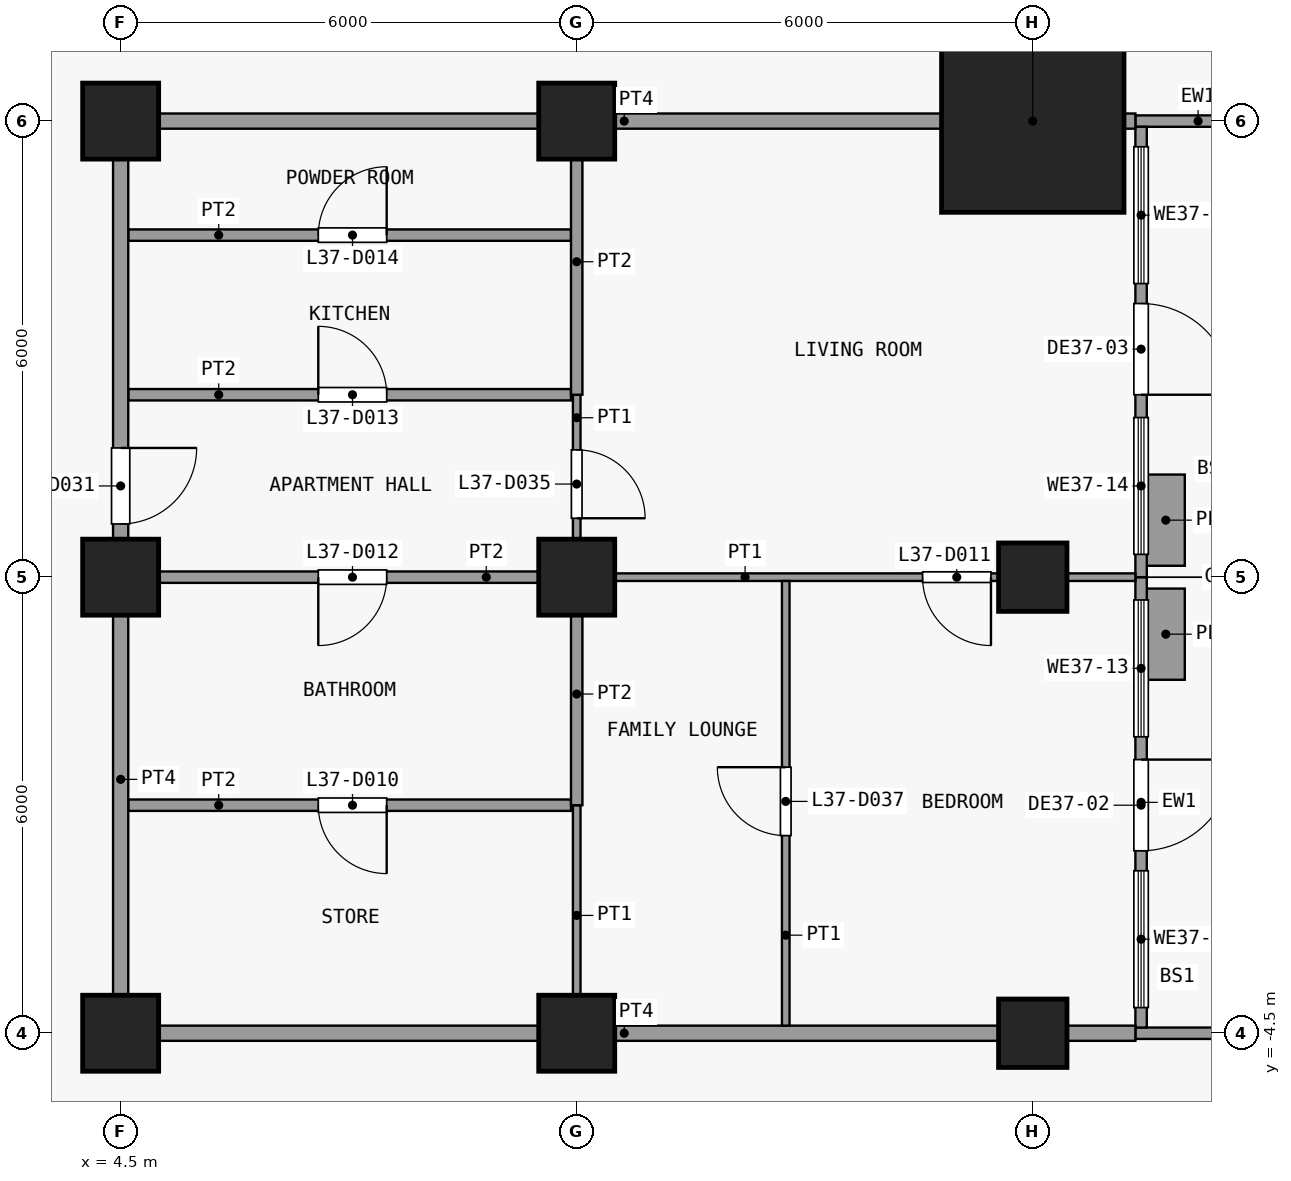
"""IFC4 building model, lengths in metres.
Left out: names, types, materials, properties, quantities, classifications, styles, units other than length and angle.
Written with IfcOpenShell. Run it as: python <this file> out.ifc"""

import sys

from ifc_helpers import new_model, si_unit, direction, frame, frame_2d, origin, origin_2d, place, context, subcontext, project, spatial, rectangle, extrude, element, fill, save


model = new_model("IFC4")
c1 = context("Model", 3, precision=1e-05, world=origin(), true_north=direction((0.0, 1.0)))
c2 = subcontext(c1, "Body", "Model", "MODEL_VIEW")
j1 = project(units=[si_unit("LENGTHUNIT", "METRE"), si_unit("PLANEANGLEUNIT", "RADIAN")], contexts=[c1])
p1 = place(None, origin())
s1 = spatial("IfcSite", under=j1, at=p1, CompositionType="ELEMENT")
p2 = place(p1, origin())
s2 = spatial("IfcBuilding", under=s1, at=p2, CompositionType="ELEMENT")
p3 = place(p2, frame((0.0, 0.0, 152.9)))
s3 = spatial("IfcBuildingStorey", under=s2, at=p3, CompositionType="ELEMENT", Elevation=152.9)
for number, where, z_axis, x_axis in (
    (1, (4.5, -4.5, 0.0), (0.0, 0.0, 1.0), (1.0, 0.0, 0.0)),
    (2, (4.5, 1.5, 0.0), (0.0, 0.0, 1.0), (1.0, 0.0, 0.0)),
    (3, (4.5, 7.5, 0.0), (0.0, 0.0, 1.0), (1.0, 0.0, 0.0)),
    (4, (10.5, -4.5, 0.0), (0.0, 0.0, 1.0), (1.0, 0.0, 0.0)),
    (5, (10.5, 1.5, 0.0), (0.0, 0.0, 1.0), (1.0, 0.0, 0.0)),
    (6, (10.5, 7.5, 0.0), (0.0, 0.0, 1.0), (1.0, 0.0, 0.0)),
):
    element("IfcColumn", number, at=place(p3, frame(where, z_axis=z_axis, x_axis=x_axis)), inside=s3, PredefinedType="COLUMN", context=c2, shape_type="SweptSolid", body=[
        extrude(rectangle(XDim=1.0, YDim=1.0, at=origin_2d()), origin(), (0.0, 0.0, 1.0), 3.6),
    ])
for number, where, z_axis, x_axis in (
    (7, (16.5, -4.5, 0.0), (0.0, 0.0, 1.0), (1.0, 0.0, 0.0)),
    (8, (16.5, 1.5, 0.0), (0.0, 0.0, 1.0), (1.0, 0.0, 0.0)),
):
    element("IfcColumn", number, at=place(p3, frame(where, z_axis=z_axis, x_axis=x_axis)), inside=s3, PredefinedType="COLUMN", context=c2, shape_type="SweptSolid", body=[
        extrude(rectangle(XDim=0.9, YDim=0.9, at=origin_2d()), origin(), (0.0, 0.0, 1.0), 3.6),
    ])
p4 = place(p3, frame((16.5, 7.5, 0.0), z_axis=(0.0, 0.0, 1.0), x_axis=(1.0, 0.0, 0.0)))
e9 = element("IfcColumn", 9, at=p4, inside=s3, PredefinedType="COLUMN", context=c2, shape_type="SweptSolid", body=[
    extrude(rectangle(XDim=2.4, YDim=2.4, at=origin_2d()), origin(), (0.0, 0.0, 1.0), 3.6),
])
p5 = place(p3, frame((17.85, -4.5, 0.0), z_axis=(0.0, 0.0, 1.0), x_axis=(1.0, 0.0, 0.0)))
e10 = element("IfcWall", 10, at=p5, inside=s3, PredefinedType="SOLIDWALL", context=c2, shape_type="SweptSolid", body=[
    extrude(rectangle(XDim=2.55, YDim=0.15, at=frame_2d((1.275, 0.0))), origin(), (0.0, 0.0, 1.0), 3.3),
])
p6 = place(p3, frame((17.925, 1.5, 0.0), z_axis=(0.0, 0.0, 1.0), x_axis=(0.0, -1.0, 0.0)))
e11 = element("IfcWall", 11, at=p6, inside=s3, PredefinedType="SOLIDWALL", context=c2, shape_type="SweptSolid", body=[
    extrude(rectangle(XDim=5.925, YDim=0.15, at=frame_2d((2.962, 0.0))), origin(), (0.0, 0.0, 1.0), 3.3),
])
p7 = place(p6, frame((2.4, 0.0, 0.0)))
e12 = element("IfcOpeningElement", 12, at=p7, cuts=e11, PredefinedType="OPENING", context=c2, shape_type="SweptSolid", body=[
    extrude(rectangle(XDim=1.2, YDim=2.4, at=frame_2d((0.6, 1.2))), frame((0.0, 0.085, 0.0), z_axis=(0.0, -1.0, 0.0), x_axis=(1.0, 0.0, 0.0)), (0.0, 0.0, 1.0), 0.17),
])
p8 = place(p6, frame((3.863, 0.0, 0.9)))
e13 = element("IfcOpeningElement", 13, at=p8, cuts=e11, PredefinedType="OPENING", context=c2, shape_type="SweptSolid", body=[
    extrude(rectangle(XDim=1.8, YDim=2.1, at=frame_2d((0.9, 1.05))), frame((0.0, 0.085, 0.0), z_axis=(0.0, -1.0, 0.0), x_axis=(1.0, 0.0, 0.0)), (0.0, 0.0, 1.0), 0.17),
])
p9 = place(p6, frame((0.3, 0.0, 0.9)))
e14 = element("IfcOpeningElement", 14, at=p9, cuts=e11, PredefinedType="OPENING", context=c2, shape_type="SweptSolid", body=[
    extrude(rectangle(XDim=1.8, YDim=2.1, at=frame_2d((0.9, 1.05))), frame((0.0, 0.085, 0.0), z_axis=(0.0, -1.0, 0.0), x_axis=(1.0, 0.0, 0.0)), (0.0, 0.0, 1.0), 0.17),
])
p10 = place(p3, frame((18.25, 0.15, 0.0), z_axis=(0.0, 0.0, 1.0), x_axis=(0.0, 1.0, 0.0)))
e15 = element("IfcWall", 15, at=p10, inside=s3, PredefinedType="USERDEFINED", context=c2, shape_type="SweptSolid", body=[
    extrude(rectangle(XDim=1.2, YDim=0.5, at=frame_2d((0.6, 0.0))), origin(), (0.0, 0.0, 1.0), 0.9),
])
p11 = place(p3, frame((17.85, 7.5, 0.0), z_axis=(0.0, 0.0, 1.0), x_axis=(1.0, 0.0, 0.0)))
e16 = element("IfcWall", 16, at=p11, inside=s3, PredefinedType="SOLIDWALL", context=c2, shape_type="SweptSolid", body=[
    extrude(rectangle(XDim=1.65, YDim=0.15, at=frame_2d((0.825, 0.0))), origin(), (0.0, 0.0, 1.0), 3.3),
])
p12 = place(p3, frame((17.925, 7.425, 0.0), z_axis=(0.0, 0.0, 1.0), x_axis=(0.0, -1.0, 0.0)))
e17 = element("IfcWall", 17, at=p12, inside=s3, PredefinedType="SOLIDWALL", context=c2, shape_type="SweptSolid", body=[
    extrude(rectangle(XDim=5.925, YDim=0.15, at=frame_2d((2.962, 0.0))), origin(), (0.0, 0.0, 1.0), 3.3),
])
p13 = place(p12, frame((2.325, 0.0, 0.0)))
e18 = element("IfcOpeningElement", 18, at=p13, cuts=e17, PredefinedType="OPENING", context=c2, shape_type="SweptSolid", body=[
    extrude(rectangle(XDim=1.2, YDim=2.4, at=frame_2d((0.6, 1.2))), frame((0.0, 0.085, 0.0), z_axis=(0.0, -1.0, 0.0), x_axis=(1.0, 0.0, 0.0)), (0.0, 0.0, 1.0), 0.17),
])
p14 = place(p12, frame((3.825, 0.0, 0.9)))
e19 = element("IfcOpeningElement", 19, at=p14, cuts=e17, PredefinedType="OPENING", context=c2, shape_type="SweptSolid", body=[
    extrude(rectangle(XDim=1.8, YDim=2.1, at=frame_2d((0.9, 1.05))), frame((0.0, 0.085, 0.0), z_axis=(0.0, -1.0, 0.0), x_axis=(1.0, 0.0, 0.0)), (0.0, 0.0, 1.0), 0.17),
])
p15 = place(p12, frame((0.262, 0.0, 0.9)))
e20 = element("IfcOpeningElement", 20, at=p15, cuts=e17, PredefinedType="OPENING", context=c2, shape_type="SweptSolid", body=[
    extrude(rectangle(XDim=1.8, YDim=2.1, at=frame_2d((0.9, 1.05))), frame((0.0, 0.085, 0.0), z_axis=(0.0, -1.0, 0.0), x_axis=(1.0, 0.0, 0.0)), (0.0, 0.0, 1.0), 0.17),
])
p16 = place(p3, frame((18.25, 1.65, 0.0), z_axis=(0.0, 0.0, 1.0), x_axis=(0.0, 1.0, 0.0)))
e21 = element("IfcWall", 21, at=p16, inside=s3, PredefinedType="USERDEFINED", context=c2, shape_type="SweptSolid", body=[
    extrude(rectangle(XDim=1.2, YDim=0.5, at=frame_2d((0.6, 0.0))), origin(), (0.0, 0.0, 1.0), 0.9),
])
p17 = place(p3, frame((4.4, -4.5, 0.0), z_axis=(0.0, 0.0, 1.0), x_axis=(1.0, 0.0, 0.0)))
e22 = element("IfcWall", 22, at=p17, inside=s3, PredefinedType="PARTITIONING", context=c2, shape_type="SweptSolid", body=[
    extrude(rectangle(XDim=13.45, YDim=0.2, at=frame_2d((6.725, 0.0))), origin(), (0.0, 0.0, 1.0), 3.3),
])
p18 = place(p3, frame((4.6, -1.5, 0.0), z_axis=(0.0, 0.0, 1.0), x_axis=(1.0, 0.0, 0.0)))
e23 = element("IfcWall", 23, at=p18, inside=s3, PredefinedType="PARTITIONING", context=c2, shape_type="SweptSolid", body=[
    extrude(rectangle(XDim=5.825, YDim=0.15, at=frame_2d((2.913, 0.0))), origin(), (0.0, 0.0, 1.0), 3.3),
])
p19 = place(p18, frame((2.5, 0.0, 0.0)))
e24 = element("IfcOpeningElement", 24, at=p19, cuts=e23, PredefinedType="OPENING", context=c2, shape_type="SweptSolid", body=[
    extrude(rectangle(XDim=0.9, YDim=2.1, at=frame_2d((0.45, 1.05))), frame((0.0, 0.085, 0.0), z_axis=(0.0, -1.0, 0.0), x_axis=(1.0, 0.0, 0.0)), (0.0, 0.0, 1.0), 0.17),
])
p20 = place(p3, frame((10.5, 1.5, 0.0), z_axis=(0.0, 0.0, 1.0), x_axis=(1.0, 0.0, 0.0)))
e25 = element("IfcWall", 25, at=p20, inside=s3, PredefinedType="PARTITIONING", context=c2, shape_type="SweptSolid", body=[
    extrude(rectangle(XDim=7.35, YDim=0.1, at=frame_2d((3.675, 0.0))), origin(), (0.0, 0.0, 1.0), 3.3),
])
p21 = place(p20, frame((4.55, 0.0, 0.0)))
e26 = element("IfcOpeningElement", 26, at=p21, cuts=e25, PredefinedType="OPENING", context=c2, shape_type="SweptSolid", body=[
    extrude(rectangle(XDim=0.9, YDim=2.1, at=frame_2d((0.45, 1.05))), frame((0.0, 0.06, 0.0), z_axis=(0.0, -1.0, 0.0), x_axis=(1.0, 0.0, 0.0)), (0.0, 0.0, 1.0), 0.12),
])
p22 = place(p3, frame((4.6, 1.5, 0.0), z_axis=(0.0, 0.0, 1.0), x_axis=(1.0, 0.0, 0.0)))
e27 = element("IfcWall", 27, at=p22, inside=s3, PredefinedType="PARTITIONING", context=c2, shape_type="SweptSolid", body=[
    extrude(rectangle(XDim=5.9, YDim=0.15, at=frame_2d((2.95, 0.0))), origin(), (0.0, 0.0, 1.0), 3.3),
])
p23 = place(p22, frame((2.5, 0.0, 0.0)))
e28 = element("IfcOpeningElement", 28, at=p23, cuts=e27, PredefinedType="OPENING", context=c2, shape_type="SweptSolid", body=[
    extrude(rectangle(XDim=0.9, YDim=2.1, at=frame_2d((0.45, 1.05))), frame((0.0, 0.085, 0.0), z_axis=(0.0, -1.0, 0.0), x_axis=(1.0, 0.0, 0.0)), (0.0, 0.0, 1.0), 0.17),
])
p24 = place(p3, frame((4.6, 3.9, 0.0), z_axis=(0.0, 0.0, 1.0), x_axis=(1.0, 0.0, 0.0)))
e29 = element("IfcWall", 29, at=p24, inside=s3, PredefinedType="PARTITIONING", context=c2, shape_type="SweptSolid", body=[
    extrude(rectangle(XDim=5.825, YDim=0.15, at=frame_2d((2.913, 0.0))), origin(), (0.0, 0.0, 1.0), 3.3),
])
p25 = place(p24, frame((2.5, 0.0, 0.0)))
e30 = element("IfcOpeningElement", 30, at=p25, cuts=e29, PredefinedType="OPENING", context=c2, shape_type="SweptSolid", body=[
    extrude(rectangle(XDim=0.9, YDim=2.1, at=frame_2d((0.45, 1.05))), frame((0.0, 0.085, 0.0), z_axis=(0.0, -1.0, 0.0), x_axis=(1.0, 0.0, 0.0)), (0.0, 0.0, 1.0), 0.17),
])
p26 = place(p3, frame((4.6, 6.0, 0.0), z_axis=(0.0, 0.0, 1.0), x_axis=(1.0, 0.0, 0.0)))
e31 = element("IfcWall", 31, at=p26, inside=s3, PredefinedType="PARTITIONING", context=c2, shape_type="SweptSolid", body=[
    extrude(rectangle(XDim=5.825, YDim=0.15, at=frame_2d((2.913, 0.0))), origin(), (0.0, 0.0, 1.0), 3.3),
])
p27 = place(p26, frame((2.5, 0.0, 0.0)))
e32 = element("IfcOpeningElement", 32, at=p27, cuts=e31, PredefinedType="OPENING", context=c2, shape_type="SweptSolid", body=[
    extrude(rectangle(XDim=0.9, YDim=2.1, at=frame_2d((0.45, 1.05))), frame((0.0, 0.085, 0.0), z_axis=(0.0, -1.0, 0.0), x_axis=(1.0, 0.0, 0.0)), (0.0, 0.0, 1.0), 0.17),
])
p28 = place(p3, frame((4.4, 7.5, 0.0), z_axis=(0.0, 0.0, 1.0), x_axis=(1.0, 0.0, 0.0)))
e33 = element("IfcWall", 33, at=p28, inside=s3, PredefinedType="PARTITIONING", context=c2, shape_type="SweptSolid", body=[
    extrude(rectangle(XDim=13.45, YDim=0.2, at=frame_2d((6.725, 0.0))), origin(), (0.0, 0.0, 1.0), 3.3),
])
p29 = place(p3, frame((4.5, -4.4, 0.0), z_axis=(0.0, 0.0, 1.0), x_axis=(0.0, 1.0, 0.0)))
e34 = element("IfcWall", 34, at=p29, inside=s3, PredefinedType="PARTITIONING", context=c2, shape_type="SweptSolid", body=[
    extrude(rectangle(XDim=11.8, YDim=0.2, at=frame_2d((5.9, 0.0))), origin(), (0.0, 0.0, 1.0), 3.3),
])
p30 = place(p29, frame((6.6, 0.0, 0.0)))
e35 = element("IfcOpeningElement", 35, at=p30, cuts=e34, PredefinedType="OPENING", context=c2, shape_type="SweptSolid", body=[
    extrude(rectangle(XDim=1.0, YDim=2.1, at=frame_2d((0.5, 1.05))), frame((0.0, 0.11, 0.0), z_axis=(0.0, -1.0, 0.0), x_axis=(1.0, 0.0, 0.0)), (0.0, 0.0, 1.0), 0.22),
])
p31 = place(p3, frame((10.5, -4.4, 0.0), z_axis=(0.0, 0.0, 1.0), x_axis=(0.0, 1.0, 0.0)))
e36 = element("IfcWall", 36, at=p31, inside=s3, PredefinedType="PARTITIONING", context=c2, shape_type="SweptSolid", body=[
    extrude(rectangle(XDim=2.9, YDim=0.1, at=frame_2d((1.45, 0.0))), origin(), (0.0, 0.0, 1.0), 3.3),
])
p32 = place(p3, frame((10.5, 1.575, 0.0), z_axis=(0.0, 0.0, 1.0), x_axis=(0.0, 1.0, 0.0)))
e37 = element("IfcWall", 37, at=p32, inside=s3, PredefinedType="PARTITIONING", context=c2, shape_type="SweptSolid", body=[
    extrude(rectangle(XDim=2.325, YDim=0.1, at=frame_2d((1.163, 0.0))), origin(), (0.0, 0.0, 1.0), 3.3),
])
p33 = place(p32, frame((0.7, 0.0, 0.0)))
e38 = element("IfcOpeningElement", 38, at=p33, cuts=e37, PredefinedType="OPENING", context=c2, shape_type="SweptSolid", body=[
    extrude(rectangle(XDim=0.9, YDim=2.1, at=frame_2d((0.45, 1.05))), frame((0.0, 0.06, 0.0), z_axis=(0.0, -1.0, 0.0), x_axis=(1.0, 0.0, 0.0)), (0.0, 0.0, 1.0), 0.12),
])
p34 = place(p3, frame((10.5, -1.5, 0.0), z_axis=(0.0, 0.0, 1.0), x_axis=(0.0, 1.0, 0.0)))
e39 = element("IfcWall", 39, at=p34, inside=s3, PredefinedType="PARTITIONING", context=c2, shape_type="SweptSolid", body=[
    extrude(rectangle(XDim=2.925, YDim=0.15, at=frame_2d((1.462, 0.0))), origin(), (0.0, 0.0, 1.0), 3.3),
])
p35 = place(p3, frame((10.5, 3.9, 0.0), z_axis=(0.0, 0.0, 1.0), x_axis=(0.0, 1.0, 0.0)))
e40 = element("IfcWall", 40, at=p35, inside=s3, PredefinedType="PARTITIONING", context=c2, shape_type="SweptSolid", body=[
    extrude(rectangle(XDim=3.5, YDim=0.15, at=frame_2d((1.75, 0.0))), origin(), (0.0, 0.0, 1.0), 3.3),
])
p36 = place(p3, frame((13.25, -4.4, 0.0), z_axis=(0.0, 0.0, 1.0), x_axis=(0.0, 1.0, 0.0)))
e41 = element("IfcWall", 41, at=p36, inside=s3, PredefinedType="PARTITIONING", context=c2, shape_type="SweptSolid", body=[
    extrude(rectangle(XDim=5.85, YDim=0.1, at=frame_2d((2.925, 0.0))), origin(), (0.0, 0.0, 1.0), 3.3),
])
p37 = place(p36, frame((2.5, 0.0, 0.0)))
e42 = element("IfcOpeningElement", 42, at=p37, cuts=e41, PredefinedType="OPENING", context=c2, shape_type="SweptSolid", body=[
    extrude(rectangle(XDim=0.9, YDim=2.1, at=frame_2d((0.45, 1.05))), frame((0.0, 0.06, 0.0), z_axis=(0.0, -1.0, 0.0), x_axis=(1.0, 0.0, 0.0)), (0.0, 0.0, 1.0), 0.12),
])
p38 = place(p7, origin())
e43 = element("IfcDoor", 43, at=p38, inside=s3, OperationType="SINGLE_SWING_LEFT", PredefinedType="DOOR", context=c2, shape_type="SweptSolid", body=[
    extrude(rectangle(XDim=1.2, YDim=2.4, at=frame_2d((0.6, 1.2))), frame((0.0, 0.025, 0.0), z_axis=(0.0, -1.0, 0.0), x_axis=(1.0, 0.0, 0.0)), (0.0, 0.0, 1.0), 0.05),
])
fill(e12, e43)
p39 = place(p8, origin())
e44 = element("IfcWindow", 44, at=p39, inside=s3, PartitioningType="SINGLE_PANEL", PredefinedType="WINDOW", context=c2, shape_type="SweptSolid", body=[
    extrude(rectangle(XDim=1.8, YDim=2.1, at=frame_2d((0.9, 1.05))), frame((0.0, 0.03, 0.0), z_axis=(0.0, -1.0, 0.0), x_axis=(1.0, 0.0, 0.0)), (0.0, 0.0, 1.0), 0.06),
])
fill(e13, e44)
p40 = place(p9, origin())
e45 = element("IfcWindow", 45, at=p40, inside=s3, PartitioningType="SINGLE_PANEL", PredefinedType="WINDOW", context=c2, shape_type="SweptSolid", body=[
    extrude(rectangle(XDim=1.8, YDim=2.1, at=frame_2d((0.9, 1.05))), frame((0.0, 0.03, 0.0), z_axis=(0.0, -1.0, 0.0), x_axis=(1.0, 0.0, 0.0)), (0.0, 0.0, 1.0), 0.06),
])
fill(e14, e45)
p41 = place(p13, origin())
e46 = element("IfcDoor", 46, at=p41, inside=s3, OperationType="SINGLE_SWING_RIGHT", PredefinedType="DOOR", context=c2, shape_type="SweptSolid", body=[
    extrude(rectangle(XDim=1.2, YDim=2.4, at=frame_2d((0.6, 1.2))), frame((0.0, 0.025, 0.0), z_axis=(0.0, -1.0, 0.0), x_axis=(1.0, 0.0, 0.0)), (0.0, 0.0, 1.0), 0.05),
])
fill(e18, e46)
p42 = place(p14, origin())
e47 = element("IfcWindow", 47, at=p42, inside=s3, PartitioningType="SINGLE_PANEL", PredefinedType="WINDOW", context=c2, shape_type="SweptSolid", body=[
    extrude(rectangle(XDim=1.8, YDim=2.1, at=frame_2d((0.9, 1.05))), frame((0.0, 0.03, 0.0), z_axis=(0.0, -1.0, 0.0), x_axis=(1.0, 0.0, 0.0)), (0.0, 0.0, 1.0), 0.06),
])
fill(e19, e47)
p43 = place(p15, origin())
e48 = element("IfcWindow", 48, at=p43, inside=s3, PartitioningType="SINGLE_PANEL", PredefinedType="WINDOW", context=c2, shape_type="SweptSolid", body=[
    extrude(rectangle(XDim=1.8, YDim=2.1, at=frame_2d((0.9, 1.05))), frame((0.0, 0.03, 0.0), z_axis=(0.0, -1.0, 0.0), x_axis=(1.0, 0.0, 0.0)), (0.0, 0.0, 1.0), 0.06),
])
fill(e20, e48)
p44 = place(p19, origin())
e49 = element("IfcDoor", 49, at=p44, inside=s3, OperationType="SINGLE_SWING_RIGHT", PredefinedType="DOOR", context=c2, shape_type="SweptSolid", body=[
    extrude(rectangle(XDim=0.9, YDim=2.1, at=frame_2d((0.45, 1.05))), frame((0.0, 0.025, 0.0), z_axis=(0.0, -1.0, 0.0), x_axis=(1.0, 0.0, 0.0)), (0.0, 0.0, 1.0), 0.05),
])
fill(e24, e49)
p45 = place(p21, origin())
e50 = element("IfcDoor", 50, at=p45, inside=s3, OperationType="SINGLE_SWING_RIGHT", PredefinedType="DOOR", context=c2, shape_type="SweptSolid", body=[
    extrude(rectangle(XDim=0.9, YDim=2.1, at=frame_2d((0.45, 1.05))), frame((0.0, 0.025, 0.0), z_axis=(0.0, -1.0, 0.0), x_axis=(1.0, 0.0, 0.0)), (0.0, 0.0, 1.0), 0.05),
])
fill(e26, e50)
p46 = place(p23, origin())
e51 = element("IfcDoor", 51, at=p46, inside=s3, OperationType="SINGLE_SWING_LEFT", PredefinedType="DOOR", context=c2, shape_type="SweptSolid", body=[
    extrude(rectangle(XDim=0.9, YDim=2.1, at=frame_2d((0.45, 1.05))), frame((0.0, 0.025, 0.0), z_axis=(0.0, -1.0, 0.0), x_axis=(1.0, 0.0, 0.0)), (0.0, 0.0, 1.0), 0.05),
])
fill(e28, e51)
p47 = place(p25, origin())
e52 = element("IfcDoor", 52, at=p47, inside=s3, OperationType="SINGLE_SWING_RIGHT", PredefinedType="DOOR", context=c2, shape_type="SweptSolid", body=[
    extrude(rectangle(XDim=0.9, YDim=2.1, at=frame_2d((0.45, 1.05))), frame((0.0, 0.025, 0.0), z_axis=(0.0, -1.0, 0.0), x_axis=(1.0, 0.0, 0.0)), (0.0, 0.0, 1.0), 0.05),
])
fill(e30, e52)
p48 = place(p27, origin())
e53 = element("IfcDoor", 53, at=p48, inside=s3, OperationType="SINGLE_SWING_LEFT", PredefinedType="DOOR", context=c2, shape_type="SweptSolid", body=[
    extrude(rectangle(XDim=0.9, YDim=2.1, at=frame_2d((0.45, 1.05))), frame((0.0, 0.025, 0.0), z_axis=(0.0, -1.0, 0.0), x_axis=(1.0, 0.0, 0.0)), (0.0, 0.0, 1.0), 0.05),
])
fill(e32, e53)
p49 = place(p30, origin())
e54 = element("IfcDoor", 54, at=p49, inside=s3, OperationType="SINGLE_SWING_RIGHT", PredefinedType="DOOR", context=c2, shape_type="SweptSolid", body=[
    extrude(rectangle(XDim=1.0, YDim=2.1, at=frame_2d((0.5, 1.05))), frame((0.0, 0.025, 0.0), z_axis=(0.0, -1.0, 0.0), x_axis=(1.0, 0.0, 0.0)), (0.0, 0.0, 1.0), 0.05),
])
fill(e35, e54)
p50 = place(p33, origin())
e55 = element("IfcDoor", 55, at=p50, inside=s3, OperationType="SINGLE_SWING_LEFT", PredefinedType="DOOR", context=c2, shape_type="SweptSolid", body=[
    extrude(rectangle(XDim=0.9, YDim=2.1, at=frame_2d((0.45, 1.05))), frame((0.0, 0.025, 0.0), z_axis=(0.0, -1.0, 0.0), x_axis=(1.0, 0.0, 0.0)), (0.0, 0.0, 1.0), 0.05),
])
fill(e38, e55)
p51 = place(p37, origin())
e56 = element("IfcDoor", 56, at=p51, inside=s3, OperationType="SINGLE_SWING_LEFT", PredefinedType="DOOR", context=c2, shape_type="SweptSolid", body=[
    extrude(rectangle(XDim=0.9, YDim=2.1, at=frame_2d((0.45, 1.05))), frame((0.0, 0.025, 0.0), z_axis=(0.0, -1.0, 0.0), x_axis=(1.0, 0.0, 0.0)), (0.0, 0.0, 1.0), 0.05),
])
fill(e42, e56)
save(model, sys.argv[1])
